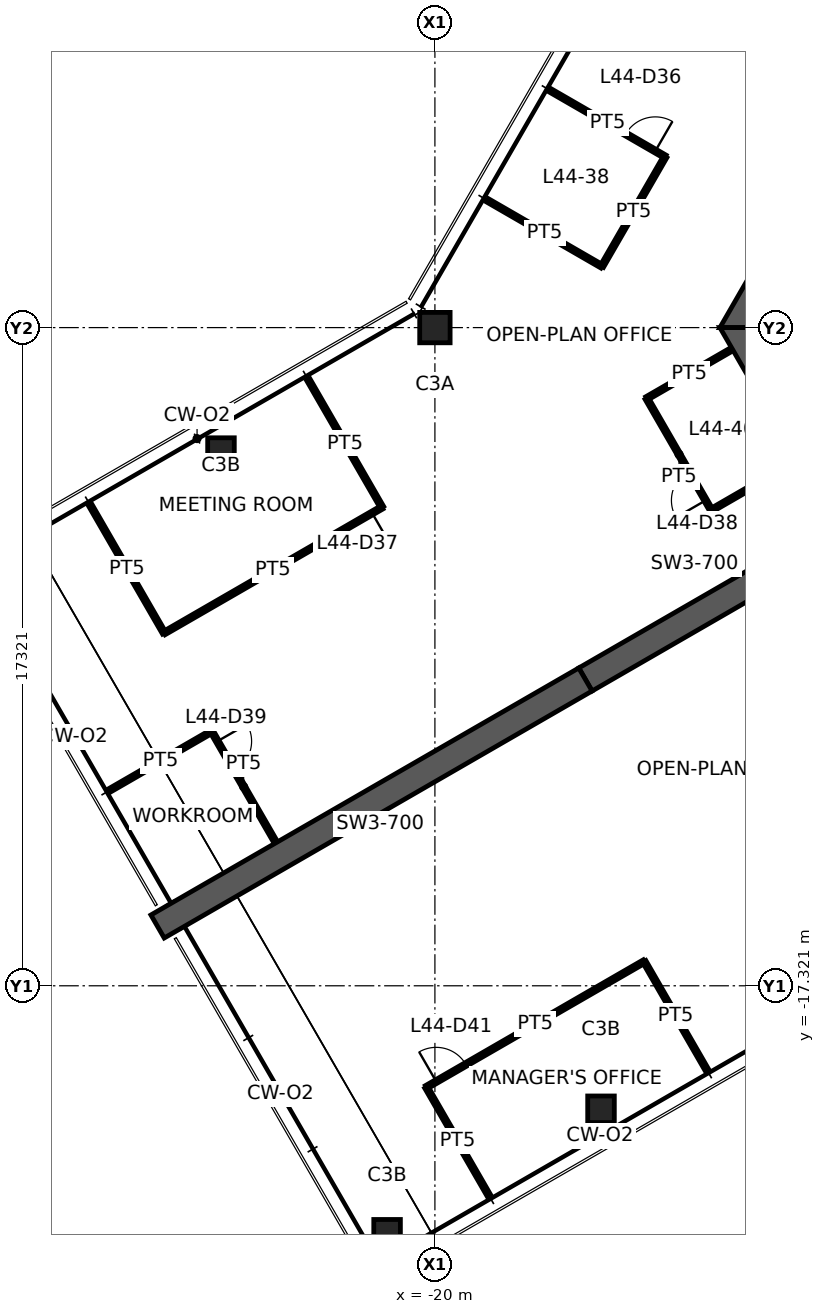
"""IFC4 building model, lengths in metres.
Left out: names, types, materials, properties, quantities, classifications, styles, units other than length and angle.
Written with IfcOpenShell. Run it as: python <this file> out.ifc"""

import sys

from ifc_helpers import new_model, si_unit, direction, frame, frame_2d, origin, origin_2d, place, context, subcontext, project, spatial, polyline, rectangle, hollow_rectangle, outline, extrude, element, fill, save


model = new_model("IFC4")
c1 = context("Model", 3, precision=1e-05, world=origin(), true_north=direction((0.0, 1.0)))
c2 = subcontext(c1, "Body", "Model", "MODEL_VIEW")
j1 = project(units=[si_unit("LENGTHUNIT", "METRE"), si_unit("PLANEANGLEUNIT", "RADIAN")], contexts=[c1])
p1 = place(None, origin())
s1 = spatial("IfcSite", under=j1, at=p1, CompositionType="ELEMENT")
p2 = place(p1, origin())
s2 = spatial("IfcBuilding", under=s1, at=p2, CompositionType="ELEMENT")
p3 = place(p2, frame((0.0, 0.0, 176.0)))
s3 = spatial("IfcBuildingStorey", under=s2, at=p3, CompositionType="ELEMENT", Elevation=176.0)
p4 = place(p3, frame((-20.0, 0.0, 0.0), z_axis=(0.0, 0.0, 1.0), x_axis=(1.0, 0.0, 0.0)))
e1 = element("IfcColumn", 1, at=p4, inside=s3, PredefinedType="COLUMN", context=c2, shape_type="SweptSolid", body=[
    extrude(hollow_rectangle(XDim=0.8, YDim=0.8, WallThickness=0.045, at=origin_2d()), origin(), (0.0, 0.0, 1.0), 3.9),
])
for number, where, z_axis, x_axis in (
    (2, (-25.629, -3.25, 0.0), (0.0, 0.0, 1.0), (1.0, 0.0, 0.0)),
    (3, (-15.629, -20.571, 0.0), (0.0, 0.0, 1.0), (1.0, 0.0, 0.0)),
    (4, (-21.258, -23.821, 0.0), (0.0, 0.0, 1.0), (1.0, 0.0, 0.0)),
):
    element("IfcColumn", number, at=place(p3, frame(where, z_axis=z_axis, x_axis=x_axis)), inside=s3, PredefinedType="COLUMN", context=c2, shape_type="SweptSolid", body=[
        extrude(hollow_rectangle(XDim=0.7, YDim=0.7, WallThickness=0.036, at=origin_2d()), origin(), (0.0, 0.0, 1.0), 3.9),
    ])
p5 = place(p3, frame((-5.961, 10.325, 0.0), z_axis=(0.0, 0.0, 1.0), x_axis=(-0.500004296715, -0.866022923061, 0.0)))
e5 = element("IfcWall", 5, at=p5, inside=s3, PredefinedType="SHEAR", context=c2, shape_type="SweptSolid", body=[
    extrude(outline(polyline([(-0.289, -0.5), (4.494, -0.5), (5.494, -0.5), (12.211, -0.5), (11.634, 0.5), (5.494, 0.5), (4.494, 0.5), (0.289, 0.5), (-0.289, -0.5)])), origin(), (0.0, 0.0, 1.0), 3.9),
])
p6 = place(p5, frame((4.494, 0.0, 0.0)))
e6 = element("IfcOpeningElement", 6, at=p6, cuts=e5, PredefinedType="OPENING", context=c2, shape_type="SweptSolid", body=[
    extrude(rectangle(XDim=1.0, YDim=2.1, at=frame_2d((0.5, 1.05))), frame((0.0, 0.51, 0.0), z_axis=(0.0, -1.0, 0.0), x_axis=(1.0, 0.0, 0.0)), (0.0, 0.0, 1.0), 1.02),
])
p7 = place(p3, frame((-11.922, 0.0, 0.0), z_axis=(0.0, 0.0, 1.0), x_axis=(0.500004296715, -0.866022923061, 0.0)))
e7 = element("IfcWall", 7, at=p7, inside=s3, PredefinedType="SHEAR", context=c2, shape_type="SweptSolid", body=[
    extrude(outline(polyline([(-0.289, -0.5), (6.331, -0.5), (7.131, -0.5), (12.211, -0.5), (11.634, 0.5), (7.131, 0.5), (6.331, 0.5), (0.289, 0.5), (-0.289, -0.5)])), origin(), (0.0, 0.0, 1.0), 3.9),
])
p8 = place(p7, frame((6.331, 0.0, 0.0)))
e8 = element("IfcOpeningElement", 8, at=p8, cuts=e7, PredefinedType="OPENING", context=c2, shape_type="SweptSolid", body=[
    extrude(rectangle(XDim=0.8, YDim=2.1, at=frame_2d((0.4, 1.05))), frame((0.0, 0.51, 0.0), z_axis=(0.0, -1.0, 0.0), x_axis=(1.0, 0.0, 0.0)), (0.0, 0.0, 1.0), 1.02),
])
p9 = place(p3, frame((-9.375, -5.413, 0.0), z_axis=(0.0, 0.0, 1.0), x_axis=(-0.866032377459, -0.499987921047, 0.0)))
e9 = element("IfcWall", 9, at=p9, inside=s3, PredefinedType="SHEAR", context=c2, shape_type="SweptSolid", body=[
    extrude(rectangle(XDim=7.696, YDim=0.7, at=frame_2d((3.848, 0.0))), origin(), (0.0, 0.0, 1.0), 3.9),
])
p10 = place(p9, frame((0.9, 0.0, 0.0)))
e10 = element("IfcOpeningElement", 10, at=p10, cuts=e9, PredefinedType="OPENING", context=c2, shape_type="SweptSolid", body=[
    extrude(rectangle(XDim=1.0, YDim=2.1, at=frame_2d((0.5, 1.05))), frame((0.0, 0.36, 0.0), z_axis=(0.0, -1.0, 0.0), x_axis=(1.0, 0.0, 0.0)), (0.0, 0.0, 1.0), 0.72),
])
p11 = place(p3, frame((-16.039, -9.26, 0.0), z_axis=(0.0, 0.0, 1.0), x_axis=(-0.866024837091, -0.50000098154, 0.0)))
e11 = element("IfcWall", 11, at=p11, inside=s3, PredefinedType="SHEAR", context=c2, shape_type="SweptSolid", body=[
    extrude(rectangle(XDim=13.0, YDim=0.7, at=frame_2d((6.5, 0.0))), origin(), (0.0, 0.0, 1.0), 3.9),
])
p12 = place(p3, frame((-16.976, 6.248, 0.0), z_axis=(0.0, 0.0, 1.0), x_axis=(0.866001150353, -0.500042005822, 0.0)))
e12 = element("IfcWall", 12, at=p12, inside=s3, PredefinedType="PARTITIONING", context=c2, shape_type="SweptSolid", body=[
    extrude(rectangle(XDim=3.505, YDim=0.1, at=frame_2d((1.752, 0.0))), origin(), (0.0, 0.0, 1.0), 2.95),
])
p13 = place(p12, frame((2.305, 0.0, 0.0)))
e13 = element("IfcOpeningElement", 13, at=p13, cuts=e12, PredefinedType="OPENING", context=c2, shape_type="SweptSolid", body=[
    extrude(rectangle(XDim=0.9, YDim=2.1, at=frame_2d((0.45, 1.05))), frame((0.0, 0.06, 0.0), z_axis=(0.0, -1.0, 0.0), x_axis=(1.0, 0.0, 0.0)), (0.0, 0.0, 1.0), 0.12),
])
p14 = place(p3, frame((-15.606, 1.611, 0.0), z_axis=(0.0, 0.0, 1.0), x_axis=(-0.86601968407, 0.500009906705, 0.0)))
e14 = element("IfcWall", 14, at=p14, inside=s3, PredefinedType="PARTITIONING", context=c2, shape_type="SweptSolid", body=[
    extrude(rectangle(XDim=3.48, YDim=0.1, at=frame_2d((1.74, 0.0))), origin(), (0.0, 0.0, 1.0), 2.95),
])
p15 = place(p3, frame((-13.941, 4.495, 0.0), z_axis=(0.0, 0.0, 1.0), x_axis=(-0.500033344505, -0.86600615147, 0.0)))
e15 = element("IfcWall", 15, at=p15, inside=s3, PredefinedType="PARTITIONING", context=c2, shape_type="SweptSolid", body=[
    extrude(rectangle(XDim=3.331, YDim=0.1, at=frame_2d((1.666, 0.0))), origin(), (0.0, 0.0, 1.0), 2.95),
])
p16 = place(p3, frame((-27.125, -8.04, 0.0), z_axis=(0.0, 0.0, 1.0), x_axis=(-0.499978621081, 0.866037746557, 0.0)))
e16 = element("IfcWall", 16, at=p16, inside=s3, PredefinedType="PARTITIONING", context=c2, shape_type="SweptSolid", body=[
    extrude(rectangle(XDim=3.905, YDim=0.1, at=frame_2d((1.953, 0.0))), origin(), (0.0, 0.0, 1.0), 2.95),
])
p17 = place(p3, frame((-23.332, -1.37, 0.0), z_axis=(0.0, 0.0, 1.0), x_axis=(0.500043804875, -0.866000111551, 0.0)))
e17 = element("IfcWall", 17, at=p17, inside=s3, PredefinedType="PARTITIONING", context=c2, shape_type="SweptSolid", body=[
    extrude(rectangle(XDim=3.88, YDim=0.1, at=frame_2d((1.94, 0.0))), origin(), (0.0, 0.0, 1.0), 2.95),
])
p18 = place(p3, frame((-21.392, -4.73, 0.0), z_axis=(0.0, 0.0, 1.0), x_axis=(-0.866030817826, -0.499990622488, 0.0)))
e18 = element("IfcWall", 18, at=p18, inside=s3, PredefinedType="PARTITIONING", context=c2, shape_type="SweptSolid", body=[
    extrude(rectangle(XDim=6.62, YDim=0.1, at=frame_2d((3.31, 0.0))), origin(), (0.0, 0.0, 1.0), 2.95),
])
p19 = place(p18, frame((0.3, 0.0, 0.0)))
e19 = element("IfcOpeningElement", 19, at=p19, cuts=e18, PredefinedType="OPENING", context=c2, shape_type="SweptSolid", body=[
    extrude(rectangle(XDim=0.9, YDim=2.1, at=frame_2d((0.45, 1.05))), frame((0.0, 0.06, 0.0), z_axis=(0.0, -1.0, 0.0), x_axis=(1.0, 0.0, 0.0)), (0.0, 0.0, 1.0), 0.12),
])
p20 = place(p3, frame((-14.427, -1.863, 0.0), z_axis=(0.0, 0.0, 1.0), x_axis=(0.866045356598, 0.49996543912, 0.0)))
e20 = element("IfcWall", 20, at=p20, inside=s3, PredefinedType="PARTITIONING", context=c2, shape_type="SweptSolid", body=[
    extrude(rectangle(XDim=2.58, YDim=0.1, at=frame_2d((1.29, 0.0))), origin(), (0.0, 0.0, 1.0), 2.95),
])
p21 = place(p3, frame((-12.726, -4.807, 0.0), z_axis=(0.0, 0.0, 1.0), x_axis=(-0.500062241894, 0.865989465428, 0.0)))
e21 = element("IfcWall", 21, at=p21, inside=s3, PredefinedType="PARTITIONING", context=c2, shape_type="SweptSolid", body=[
    extrude(rectangle(XDim=3.4, YDim=0.1, at=frame_2d((1.7, 0.0))), origin(), (0.0, 0.0, 1.0), 2.95),
])
p22 = place(p21, frame((0.3, 0.0, 0.0)))
e22 = element("IfcOpeningElement", 22, at=p22, cuts=e21, PredefinedType="OPENING", context=c2, shape_type="SweptSolid", body=[
    extrude(rectangle(XDim=0.9, YDim=2.1, at=frame_2d((0.45, 1.05))), frame((0.0, 0.06, 0.0), z_axis=(0.0, -1.0, 0.0), x_axis=(1.0, 0.0, 0.0)), (0.0, 0.0, 1.0), 0.12),
])
p23 = place(p3, frame((-10.492, -3.517, 0.0), z_axis=(0.0, 0.0, 1.0), x_axis=(-0.866021702275, -0.500006411147, 0.0)))
e23 = element("IfcWall", 23, at=p23, inside=s3, PredefinedType="PARTITIONING", context=c2, shape_type="SweptSolid", body=[
    extrude(rectangle(XDim=2.58, YDim=0.1, at=frame_2d((1.29, 0.0))), origin(), (0.0, 0.0, 1.0), 2.95),
])
p24 = place(p3, frame((-28.562, -12.18, 0.0), z_axis=(0.0, 0.0, 1.0), x_axis=(0.866042875753, 0.499969736442, 0.0)))
e24 = element("IfcWall", 24, at=p24, inside=s3, PredefinedType="PARTITIONING", context=c2, shape_type="SweptSolid", body=[
    extrude(rectangle(XDim=3.105, YDim=0.1, at=frame_2d((1.553, 0.0))), origin(), (0.0, 0.0, 1.0), 2.95),
])
p25 = place(p3, frame((-25.873, -10.627, 0.0), z_axis=(0.0, 0.0, 1.0), x_axis=(0.5000115033, -0.866018762249, 0.0)))
e25 = element("IfcWall", 25, at=p25, inside=s3, PredefinedType="PARTITIONING", context=c2, shape_type="SweptSolid", body=[
    extrude(rectangle(XDim=3.363, YDim=0.1, at=frame_2d((1.682, 0.0))), origin(), (0.0, 0.0, 1.0), 2.95),
])
p26 = place(p25, frame((0.3, 0.0, 0.0)))
e26 = element("IfcOpeningElement", 26, at=p26, cuts=e25, PredefinedType="OPENING", context=c2, shape_type="SweptSolid", body=[
    extrude(rectangle(XDim=0.9, YDim=2.1, at=frame_2d((0.45, 1.05))), frame((0.0, 0.06, 0.0), z_axis=(0.0, -1.0, 0.0), x_axis=(1.0, 0.0, 0.0)), (0.0, 0.0, 1.0), 0.12),
])
p27 = place(p3, frame((-20.225, -19.991, 0.0), z_axis=(0.0, 0.0, 1.0), x_axis=(0.866030817826, 0.499990622488, 0.0)))
e27 = element("IfcWall", 27, at=p27, inside=s3, PredefinedType="PARTITIONING", context=c2, shape_type="SweptSolid", body=[
    extrude(rectangle(XDim=6.62, YDim=0.1, at=frame_2d((3.31, 0.0))), origin(), (0.0, 0.0, 1.0), 2.95),
])
p28 = place(p27, frame((0.3, 0.0, 0.0)))
e28 = element("IfcOpeningElement", 28, at=p28, cuts=e27, PredefinedType="OPENING", context=c2, shape_type="SweptSolid", body=[
    extrude(rectangle(XDim=0.9, YDim=2.1, at=frame_2d((0.45, 1.05))), frame((0.0, 0.06, 0.0), z_axis=(0.0, -1.0, 0.0), x_axis=(1.0, 0.0, 0.0)), (0.0, 0.0, 1.0), 0.12),
])
p29 = place(p3, frame((-18.585, -22.831, 0.0), z_axis=(0.0, 0.0, 1.0), x_axis=(-0.50002956483, 0.866008333849, 0.0)))
e29 = element("IfcWall", 29, at=p29, inside=s3, PredefinedType="PARTITIONING", context=c2, shape_type="SweptSolid", body=[
    extrude(rectangle(XDim=3.28, YDim=0.1, at=frame_2d((1.64, 0.0))), origin(), (0.0, 0.0, 1.0), 2.95),
])
p30 = place(p3, frame((-14.492, -16.681, 0.0), z_axis=(0.0, 0.0, 1.0), x_axis=(0.500008057651, -0.866020751647, 0.0)))
e30 = element("IfcWall", 30, at=p30, inside=s3, PredefinedType="PARTITIONING", context=c2, shape_type="SweptSolid", body=[
    extrude(rectangle(XDim=3.305, YDim=0.1, at=frame_2d((1.653, 0.0))), origin(), (0.0, 0.0, 1.0), 2.95),
])
p31 = place(p13, origin())
e31 = element("IfcDoor", 31, at=p31, inside=s3, OperationType="SINGLE_SWING_RIGHT", PredefinedType="DOOR", context=c2, shape_type="SweptSolid", body=[
    extrude(rectangle(XDim=0.9, YDim=2.1, at=frame_2d((0.45, 1.05))), frame((0.0, 0.025, 0.0), z_axis=(0.0, -1.0, 0.0), x_axis=(1.0, 0.0, 0.0)), (0.0, 0.0, 1.0), 0.05),
])
fill(e13, e31)
p32 = place(p19, origin())
e32 = element("IfcDoor", 32, at=p32, inside=s3, OperationType="SINGLE_SWING_LEFT", PredefinedType="DOOR", context=c2, shape_type="SweptSolid", body=[
    extrude(rectangle(XDim=0.9, YDim=2.1, at=frame_2d((0.45, 1.05))), frame((0.0, 0.025, 0.0), z_axis=(0.0, -1.0, 0.0), x_axis=(1.0, 0.0, 0.0)), (0.0, 0.0, 1.0), 0.05),
])
fill(e19, e32)
p33 = place(p22, origin())
e33 = element("IfcDoor", 33, at=p33, inside=s3, OperationType="SINGLE_SWING_LEFT", PredefinedType="DOOR", context=c2, shape_type="SweptSolid", body=[
    extrude(rectangle(XDim=0.9, YDim=2.1, at=frame_2d((0.45, 1.05))), frame((0.0, 0.025, 0.0), z_axis=(0.0, -1.0, 0.0), x_axis=(1.0, 0.0, 0.0)), (0.0, 0.0, 1.0), 0.05),
])
fill(e22, e33)
p34 = place(p26, origin())
e34 = element("IfcDoor", 34, at=p34, inside=s3, OperationType="SINGLE_SWING_LEFT", PredefinedType="DOOR", context=c2, shape_type="SweptSolid", body=[
    extrude(rectangle(XDim=0.9, YDim=2.1, at=frame_2d((0.45, 1.05))), frame((0.0, 0.025, 0.0), z_axis=(0.0, -1.0, 0.0), x_axis=(1.0, 0.0, 0.0)), (0.0, 0.0, 1.0), 0.05),
])
fill(e26, e34)
p35 = place(p28, origin())
e35 = element("IfcDoor", 35, at=p35, inside=s3, OperationType="SINGLE_SWING_LEFT", PredefinedType="DOOR", context=c2, shape_type="SweptSolid", body=[
    extrude(rectangle(XDim=0.9, YDim=2.1, at=frame_2d((0.45, 1.05))), frame((0.0, 0.025, 0.0), z_axis=(0.0, -1.0, 0.0), x_axis=(1.0, 0.0, 0.0)), (0.0, 0.0, 1.0), 0.05),
])
fill(e28, e35)
save(model, sys.argv[1])
